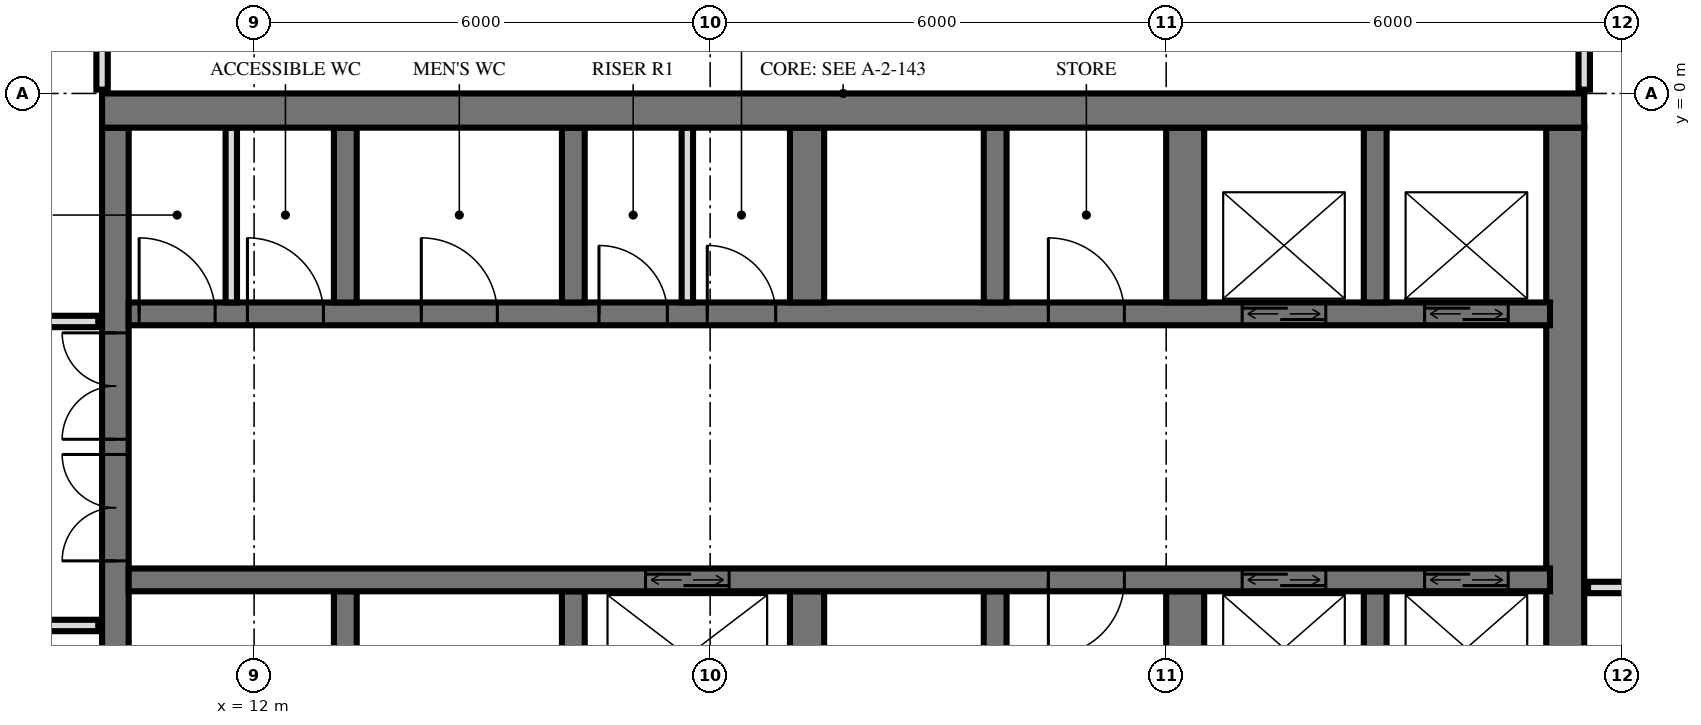
"""IFC4 building model, lengths in metres.
Left out: names, types, materials, properties, quantities, classifications, styles, units other than length and angle.
Written with IfcOpenShell. Run it as: python <this file> out.ifc"""

import sys

from ifc_helpers import new_model, si_unit, direction, frame, frame_2d, origin, place, context, subcontext, project, spatial, rectangle, extrude, element, fill, save


model = new_model("IFC4")
c1 = context("Model", 3, precision=1e-05, world=origin(), true_north=direction((0.0, 1.0)))
c2 = subcontext(c1, "Body", "Model", "MODEL_VIEW")
j1 = project(units=[si_unit("LENGTHUNIT", "METRE"), si_unit("PLANEANGLEUNIT", "RADIAN")], contexts=[c1])
p1 = place(None, origin())
s1 = spatial("IfcSite", under=j1, at=p1, CompositionType="ELEMENT")
p2 = place(p1, origin())
s2 = spatial("IfcBuilding", under=s1, at=p2, CompositionType="ELEMENT")
p3 = place(p2, frame((0.0, 0.0, 70.8)))
s3 = spatial("IfcBuildingStorey", under=s2, at=p3, CompositionType="ELEMENT", Elevation=70.8)
p4 = place(p3, frame((10.0, -0.225, 0.0), z_axis=(0.0, 0.0, 1.0), x_axis=(1.0, 0.0, 0.0)))
e1 = element("IfcWall", 1, at=p4, inside=s3, PredefinedType="SHEAR", context=c2, shape_type="SweptSolid", body=[
    extrude(rectangle(XDim=19.5, YDim=0.45, at=frame_2d((9.75, 0.0))), origin(), (0.0, 0.0, 1.0), 3.6),
])
p5 = place(p3, frame((10.175, -14.55, 0.0), z_axis=(0.0, 0.0, 1.0), x_axis=(0.0, 1.0, 0.0)))
e2 = element("IfcWall", 2, at=p5, inside=s3, PredefinedType="SHEAR", context=c2, shape_type="SweptSolid", body=[
    extrude(rectangle(XDim=14.1, YDim=0.35, at=frame_2d((7.05, 0.0))), origin(), (0.0, 0.0, 1.0), 3.6),
])
p6 = place(p5, frame((8.4, 0.0, 0.0)))
e3 = element("IfcOpeningElement", 3, at=p6, cuts=e2, PredefinedType="OPENING", context=c2, shape_type="SweptSolid", body=[
    extrude(rectangle(XDim=1.4, YDim=2.4, at=frame_2d((0.7, 1.2))), frame((0.0, 0.185, 0.0), z_axis=(0.0, -1.0, 0.0), x_axis=(1.0, 0.0, 0.0)), (0.0, 0.0, 1.0), 0.37),
])
p7 = place(p5, frame((10.0, 0.0, 0.0)))
e4 = element("IfcOpeningElement", 4, at=p7, cuts=e2, PredefinedType="OPENING", context=c2, shape_type="SweptSolid", body=[
    extrude(rectangle(XDim=1.4, YDim=2.4, at=frame_2d((0.7, 1.2))), frame((0.0, 0.185, 0.0), z_axis=(0.0, -1.0, 0.0), x_axis=(1.0, 0.0, 0.0)), (0.0, 0.0, 1.0), 0.37),
])
p8 = place(p5, frame((4.0, 0.0, 0.0)))
e5 = element("IfcOpeningElement", 5, at=p8, cuts=e2, PredefinedType="OPENING", context=c2, shape_type="SweptSolid", body=[
    extrude(rectangle(XDim=1.2, YDim=2.1, at=frame_2d((0.6, 1.05))), frame((0.0, 0.185, 0.0), z_axis=(0.0, -1.0, 0.0), x_axis=(1.0, 0.0, 0.0)), (0.0, 0.0, 1.0), 0.37),
])
p9 = place(p3, frame((29.25, -14.55, 0.0), z_axis=(0.0, 0.0, 1.0), x_axis=(0.0, 1.0, 0.0)))
e6 = element("IfcWall", 6, at=p9, inside=s3, PredefinedType="SHEAR", context=c2, shape_type="SweptSolid", body=[
    extrude(rectangle(XDim=14.1, YDim=0.5, at=frame_2d((7.05, 0.0))), origin(), (0.0, 0.0, 1.0), 3.6),
])
p10 = place(p3, frame((10.35, -2.9, 0.0), z_axis=(0.0, 0.0, 1.0), x_axis=(1.0, 0.0, 0.0)))
e7 = element("IfcWall", 7, at=p10, inside=s3, PredefinedType="SHEAR", context=c2, shape_type="SweptSolid", body=[
    extrude(rectangle(XDim=18.7, YDim=0.3, at=frame_2d((9.35, 0.0))), origin(), (0.0, 0.0, 1.0), 3.6),
])
p11 = place(p10, frame((14.65, 0.0, 0.0)))
e8 = element("IfcOpeningElement", 8, at=p11, cuts=e7, PredefinedType="OPENING", context=c2, shape_type="SweptSolid", body=[
    extrude(rectangle(XDim=1.1, YDim=2.1, at=frame_2d((0.55, 1.05))), frame((0.0, 0.16, 0.0), z_axis=(0.0, -1.0, 0.0), x_axis=(1.0, 0.0, 0.0)), (0.0, 0.0, 1.0), 0.32),
])
p12 = place(p10, frame((17.05, 0.0, 0.0)))
e9 = element("IfcOpeningElement", 9, at=p12, cuts=e7, PredefinedType="OPENING", context=c2, shape_type="SweptSolid", body=[
    extrude(rectangle(XDim=1.1, YDim=2.1, at=frame_2d((0.55, 1.05))), frame((0.0, 0.16, 0.0), z_axis=(0.0, -1.0, 0.0), x_axis=(1.0, 0.0, 0.0)), (0.0, 0.0, 1.0), 0.32),
])
p13 = place(p10, frame((6.188, 0.0, 0.0)))
e10 = element("IfcOpeningElement", 10, at=p13, cuts=e7, PredefinedType="OPENING", context=c2, shape_type="SweptSolid", body=[
    extrude(rectangle(XDim=0.9, YDim=2.1, at=frame_2d((0.45, 1.05))), frame((0.0, 0.16, 0.0), z_axis=(0.0, -1.0, 0.0), x_axis=(1.0, 0.0, 0.0)), (0.0, 0.0, 1.0), 0.32),
])
p14 = place(p10, frame((7.613, 0.0, 0.0)))
e11 = element("IfcOpeningElement", 11, at=p14, cuts=e7, PredefinedType="OPENING", context=c2, shape_type="SweptSolid", body=[
    extrude(rectangle(XDim=0.9, YDim=2.1, at=frame_2d((0.45, 1.05))), frame((0.0, 0.16, 0.0), z_axis=(0.0, -1.0, 0.0), x_axis=(1.0, 0.0, 0.0)), (0.0, 0.0, 1.0), 0.32),
])
p15 = place(p10, frame((0.137, 0.0, 0.0)))
e12 = element("IfcOpeningElement", 12, at=p15, cuts=e7, PredefinedType="OPENING", context=c2, shape_type="SweptSolid", body=[
    extrude(rectangle(XDim=1.0, YDim=2.1, at=frame_2d((0.5, 1.05))), frame((0.0, 0.16, 0.0), z_axis=(0.0, -1.0, 0.0), x_axis=(1.0, 0.0, 0.0)), (0.0, 0.0, 1.0), 0.32),
])
p16 = place(p10, frame((1.562, 0.0, 0.0)))
e13 = element("IfcOpeningElement", 13, at=p16, cuts=e7, PredefinedType="OPENING", context=c2, shape_type="SweptSolid", body=[
    extrude(rectangle(XDim=1.0, YDim=2.1, at=frame_2d((0.5, 1.05))), frame((0.0, 0.16, 0.0), z_axis=(0.0, -1.0, 0.0), x_axis=(1.0, 0.0, 0.0)), (0.0, 0.0, 1.0), 0.32),
])
p17 = place(p10, frame((3.85, 0.0, 0.0)))
e14 = element("IfcOpeningElement", 14, at=p17, cuts=e7, PredefinedType="OPENING", context=c2, shape_type="SweptSolid", body=[
    extrude(rectangle(XDim=1.0, YDim=2.1, at=frame_2d((0.5, 1.05))), frame((0.0, 0.16, 0.0), z_axis=(0.0, -1.0, 0.0), x_axis=(1.0, 0.0, 0.0)), (0.0, 0.0, 1.0), 0.32),
])
p18 = place(p10, frame((12.1, 0.0, 0.0)))
e15 = element("IfcOpeningElement", 15, at=p18, cuts=e7, PredefinedType="OPENING", context=c2, shape_type="SweptSolid", body=[
    extrude(rectangle(XDim=1.0, YDim=2.1, at=frame_2d((0.5, 1.05))), frame((0.0, 0.16, 0.0), z_axis=(0.0, -1.0, 0.0), x_axis=(1.0, 0.0, 0.0)), (0.0, 0.0, 1.0), 0.32),
])
p19 = place(p3, frame((10.35, -6.4, 0.0), z_axis=(0.0, 0.0, 1.0), x_axis=(1.0, 0.0, 0.0)))
e16 = element("IfcWall", 16, at=p19, inside=s3, PredefinedType="SHEAR", context=c2, shape_type="SweptSolid", body=[
    extrude(rectangle(XDim=18.7, YDim=0.3, at=frame_2d((9.35, 0.0))), origin(), (0.0, 0.0, 1.0), 3.6),
])
p20 = place(p19, frame((14.65, 0.0, 0.0)))
e17 = element("IfcOpeningElement", 17, at=p20, cuts=e16, PredefinedType="OPENING", context=c2, shape_type="SweptSolid", body=[
    extrude(rectangle(XDim=1.1, YDim=2.1, at=frame_2d((0.55, 1.05))), frame((0.0, 0.16, 0.0), z_axis=(0.0, -1.0, 0.0), x_axis=(1.0, 0.0, 0.0)), (0.0, 0.0, 1.0), 0.32),
])
p21 = place(p19, frame((17.05, 0.0, 0.0)))
e18 = element("IfcOpeningElement", 18, at=p21, cuts=e16, PredefinedType="OPENING", context=c2, shape_type="SweptSolid", body=[
    extrude(rectangle(XDim=1.1, YDim=2.1, at=frame_2d((0.55, 1.05))), frame((0.0, 0.16, 0.0), z_axis=(0.0, -1.0, 0.0), x_axis=(1.0, 0.0, 0.0)), (0.0, 0.0, 1.0), 0.32),
])
p22 = place(p19, frame((6.8, 0.0, 0.0)))
e19 = element("IfcOpeningElement", 19, at=p22, cuts=e16, PredefinedType="OPENING", context=c2, shape_type="SweptSolid", body=[
    extrude(rectangle(XDim=1.1, YDim=2.1, at=frame_2d((0.55, 1.05))), frame((0.0, 0.16, 0.0), z_axis=(0.0, -1.0, 0.0), x_axis=(1.0, 0.0, 0.0)), (0.0, 0.0, 1.0), 0.32),
])
p23 = place(p19, frame((12.1, 0.0, 0.0)))
e20 = element("IfcOpeningElement", 20, at=p23, cuts=e16, PredefinedType="OPENING", context=c2, shape_type="SweptSolid", body=[
    extrude(rectangle(XDim=1.0, YDim=2.1, at=frame_2d((0.5, 1.05))), frame((0.0, 0.16, 0.0), z_axis=(0.0, -1.0, 0.0), x_axis=(1.0, 0.0, 0.0)), (0.0, 0.0, 1.0), 0.32),
])
for number, where, z_axis, x_axis in (
    (21, (13.2, -2.75, 0.0), (0.0, 0.0, 1.0), (0.0, 1.0, 0.0)),
    (22, (13.2, -8.85, 0.0), (0.0, 0.0, 1.0), (0.0, 1.0, 0.0)),
    (23, (16.2, -2.75, 0.0), (0.0, 0.0, 1.0), (0.0, 1.0, 0.0)),
    (24, (16.2, -8.85, 0.0), (0.0, 0.0, 1.0), (0.0, 1.0, 0.0)),
):
    element("IfcWall", number, at=place(p3, frame(where, z_axis=z_axis, x_axis=x_axis)), inside=s3, PredefinedType="SHEAR", context=c2, shape_type="SweptSolid", body=[
        extrude(rectangle(XDim=2.3, YDim=0.3, at=frame_2d((1.15, 0.0))), origin(), (0.0, 0.0, 1.0), 3.6),
    ])
for number, where, z_axis, x_axis in (
    (25, (19.275, -2.75, 0.0), (0.0, 0.0, 1.0), (0.0, 1.0, 0.0)),
    (26, (19.275, -8.85, 0.0), (0.0, 0.0, 1.0), (0.0, 1.0, 0.0)),
):
    element("IfcWall", number, at=place(p3, frame(where, z_axis=z_axis, x_axis=x_axis)), inside=s3, PredefinedType="SHEAR", context=c2, shape_type="SweptSolid", body=[
        extrude(rectangle(XDim=2.3, YDim=0.45, at=frame_2d((1.15, 0.0))), origin(), (0.0, 0.0, 1.0), 3.6),
    ])
for number, where, z_axis, x_axis in (
    (27, (21.75, -2.75, 0.0), (0.0, 0.0, 1.0), (0.0, 1.0, 0.0)),
    (28, (21.75, -8.85, 0.0), (0.0, 0.0, 1.0), (0.0, 1.0, 0.0)),
):
    element("IfcWall", number, at=place(p3, frame(where, z_axis=z_axis, x_axis=x_axis)), inside=s3, PredefinedType="SHEAR", context=c2, shape_type="SweptSolid", body=[
        extrude(rectangle(XDim=2.3, YDim=0.3, at=frame_2d((1.15, 0.0))), origin(), (0.0, 0.0, 1.0), 3.6),
    ])
for number, where, z_axis, x_axis in (
    (29, (24.25, -2.75, 0.0), (0.0, 0.0, 1.0), (0.0, 1.0, 0.0)),
    (30, (24.25, -8.85, 0.0), (0.0, 0.0, 1.0), (0.0, 1.0, 0.0)),
):
    element("IfcWall", number, at=place(p3, frame(where, z_axis=z_axis, x_axis=x_axis)), inside=s3, PredefinedType="SHEAR", context=c2, shape_type="SweptSolid", body=[
        extrude(rectangle(XDim=2.3, YDim=0.5, at=frame_2d((1.15, 0.0))), origin(), (0.0, 0.0, 1.0), 3.6),
    ])
for number, where, z_axis, x_axis in (
    (31, (26.75, -2.75, 0.0), (0.0, 0.0, 1.0), (0.0, 1.0, 0.0)),
    (32, (26.75, -8.85, 0.0), (0.0, 0.0, 1.0), (0.0, 1.0, 0.0)),
):
    element("IfcWall", number, at=place(p3, frame(where, z_axis=z_axis, x_axis=x_axis)), inside=s3, PredefinedType="SHEAR", context=c2, shape_type="SweptSolid", body=[
        extrude(rectangle(XDim=2.3, YDim=0.3, at=frame_2d((1.15, 0.0))), origin(), (0.0, 0.0, 1.0), 3.6),
    ])
for number, where, z_axis, x_axis in (
    (33, (17.7, -2.75, 0.0), (0.0, 0.0, 1.0), (0.0, 1.0, 0.0)),
    (34, (11.7, -2.75, 0.0), (0.0, 0.0, 1.0), (0.0, 1.0, 0.0)),
):
    element("IfcWall", number, at=place(p3, frame(where, z_axis=z_axis, x_axis=x_axis)), inside=s3, PredefinedType="PARTITIONING", context=c2, shape_type="SweptSolid", body=[
        extrude(rectangle(XDim=2.3, YDim=0.15, at=frame_2d((1.15, 0.0))), origin(), (0.0, 0.0, 1.0), 3.3),
    ])
p24 = place(p3, frame((29.5, 0.05, 0.0), z_axis=(0.0, 0.0, 1.0), x_axis=(0.0, 1.0, 0.0)))
e35 = element("IfcWall", 35, at=p24, inside=s3, PredefinedType="PARTITIONING", context=c2, shape_type="SweptSolid", body=[
    extrude(rectangle(XDim=0.827, YDim=0.15, at=frame_2d((0.414, 0.0))), origin(), (0.0, 0.0, 1.0), 3.32),
])
p25 = place(p3, frame((10.0, 0.05, 0.0), z_axis=(0.0, 0.0, 1.0), x_axis=(0.0, 1.0, 0.0)))
e36 = element("IfcWall", 36, at=p25, inside=s3, PredefinedType="PARTITIONING", context=c2, shape_type="SweptSolid", body=[
    extrude(rectangle(XDim=0.97, YDim=0.15, at=frame_2d((0.485, 0.0))), origin(), (0.0, 0.0, 1.0), 3.32),
])
p26 = place(p3, frame((-9.95, -7.0, 0.0), z_axis=(0.0, 0.0, 1.0), x_axis=(1.0, 0.0, 0.0)))
e37 = element("IfcWall", 37, at=p26, inside=s3, PredefinedType="PARTITIONING", context=c2, shape_type="SweptSolid", body=[
    extrude(rectangle(XDim=19.9, YDim=0.15, at=frame_2d((9.95, 0.0))), origin(), (0.0, 0.0, 1.0), 3.32),
])
p27 = place(p26, frame((9.45, 0.0, 0.0)))
e38 = element("IfcOpeningElement", 38, at=p27, cuts=e37, PredefinedType="OPENING", context=c2, shape_type="SweptSolid", body=[
    extrude(rectangle(XDim=1.0, YDim=2.1, at=frame_2d((0.5, 1.05))), frame((0.0, 0.085, 0.0), z_axis=(0.0, -1.0, 0.0), x_axis=(1.0, 0.0, 0.0)), (0.0, 0.0, 1.0), 0.17),
])
p28 = place(p26, frame((3.45, 0.0, 0.0)))
e39 = element("IfcOpeningElement", 39, at=p28, cuts=e37, PredefinedType="OPENING", context=c2, shape_type="SweptSolid", body=[
    extrude(rectangle(XDim=1.0, YDim=2.1, at=frame_2d((0.5, 1.05))), frame((0.0, 0.085, 0.0), z_axis=(0.0, -1.0, 0.0), x_axis=(1.0, 0.0, 0.0)), (0.0, 0.0, 1.0), 0.17),
])
p29 = place(p3, frame((29.55, -6.5, 0.0), z_axis=(0.0, 0.0, 1.0), x_axis=(1.0, 0.0, 0.0)))
e40 = element("IfcWall", 40, at=p29, inside=s3, PredefinedType="PARTITIONING", context=c2, shape_type="SweptSolid", body=[
    extrude(rectangle(XDim=3.57, YDim=0.15, at=frame_2d((1.785, 0.0))), origin(), (0.0, 0.0, 1.0), 3.32),
])
p30 = place(p29, frame((1.4, 0.0, 0.0)))
e41 = element("IfcOpeningElement", 41, at=p30, cuts=e40, PredefinedType="OPENING", context=c2, shape_type="SweptSolid", body=[
    extrude(rectangle(XDim=0.9, YDim=2.1, at=frame_2d((0.45, 1.05))), frame((0.0, 0.085, 0.0), z_axis=(0.0, -1.0, 0.0), x_axis=(1.0, 0.0, 0.0)), (0.0, 0.0, 1.0), 0.17),
])
p31 = place(p3, frame((-9.95, -3.0, 0.0), z_axis=(0.0, 0.0, 1.0), x_axis=(1.0, 0.0, 0.0)))
e42 = element("IfcWall", 42, at=p31, inside=s3, PredefinedType="PARTITIONING", context=c2, shape_type="SweptSolid", body=[
    extrude(rectangle(XDim=19.9, YDim=0.15, at=frame_2d((9.95, 0.0))), origin(), (0.0, 0.0, 1.0), 3.32),
])
p32 = place(p31, frame((1.45, 0.0, 0.0)))
e43 = element("IfcOpeningElement", 43, at=p32, cuts=e42, PredefinedType="OPENING", context=c2, shape_type="SweptSolid", body=[
    extrude(rectangle(XDim=1.0, YDim=2.1, at=frame_2d((0.5, 1.05))), frame((0.0, 0.085, 0.0), z_axis=(0.0, -1.0, 0.0), x_axis=(1.0, 0.0, 0.0)), (0.0, 0.0, 1.0), 0.17),
])
p33 = place(p31, frame((4.95, 0.0, 0.0)))
e44 = element("IfcOpeningElement", 44, at=p33, cuts=e42, PredefinedType="OPENING", context=c2, shape_type="SweptSolid", body=[
    extrude(rectangle(XDim=1.0, YDim=2.1, at=frame_2d((0.5, 1.05))), frame((0.0, 0.085, 0.0), z_axis=(0.0, -1.0, 0.0), x_axis=(1.0, 0.0, 0.0)), (0.0, 0.0, 1.0), 0.17),
])
p34 = place(p31, frame((7.7, 0.0, 0.0)))
e45 = element("IfcOpeningElement", 45, at=p34, cuts=e42, PredefinedType="OPENING", context=c2, shape_type="SweptSolid", body=[
    extrude(rectangle(XDim=1.0, YDim=2.1, at=frame_2d((0.5, 1.05))), frame((0.0, 0.085, 0.0), z_axis=(0.0, -1.0, 0.0), x_axis=(1.0, 0.0, 0.0)), (0.0, 0.0, 1.0), 0.17),
])
p35 = place(p31, frame((14.2, 0.0, 0.0)))
e46 = element("IfcOpeningElement", 46, at=p35, cuts=e42, PredefinedType="OPENING", context=c2, shape_type="SweptSolid", body=[
    extrude(rectangle(XDim=1.0, YDim=2.1, at=frame_2d((0.5, 1.05))), frame((0.0, 0.085, 0.0), z_axis=(0.0, -1.0, 0.0), x_axis=(1.0, 0.0, 0.0)), (0.0, 0.0, 1.0), 0.17),
])
p36 = place(p11, origin())
e47 = element("IfcDoor", 47, at=p36, inside=s3, OperationType="DOUBLE_DOOR_SLIDING", PredefinedType="USERDEFINED", context=c2, shape_type="SweptSolid", body=[
    extrude(rectangle(XDim=1.1, YDim=2.1, at=frame_2d((0.55, 1.05))), frame((0.0, 0.025, 0.0), z_axis=(0.0, -1.0, 0.0), x_axis=(1.0, 0.0, 0.0)), (0.0, 0.0, 1.0), 0.05),
])
fill(e8, e47)
p37 = place(p12, origin())
e48 = element("IfcDoor", 48, at=p37, inside=s3, OperationType="DOUBLE_DOOR_SLIDING", PredefinedType="USERDEFINED", context=c2, shape_type="SweptSolid", body=[
    extrude(rectangle(XDim=1.1, YDim=2.1, at=frame_2d((0.55, 1.05))), frame((0.0, 0.025, 0.0), z_axis=(0.0, -1.0, 0.0), x_axis=(1.0, 0.0, 0.0)), (0.0, 0.0, 1.0), 0.05),
])
fill(e9, e48)
p38 = place(p20, origin())
e49 = element("IfcDoor", 49, at=p38, inside=s3, OperationType="DOUBLE_DOOR_SLIDING", PredefinedType="USERDEFINED", context=c2, shape_type="SweptSolid", body=[
    extrude(rectangle(XDim=1.1, YDim=2.1, at=frame_2d((0.55, 1.05))), frame((0.0, 0.025, 0.0), z_axis=(0.0, -1.0, 0.0), x_axis=(1.0, 0.0, 0.0)), (0.0, 0.0, 1.0), 0.05),
])
fill(e17, e49)
p39 = place(p21, origin())
e50 = element("IfcDoor", 50, at=p39, inside=s3, OperationType="DOUBLE_DOOR_SLIDING", PredefinedType="USERDEFINED", context=c2, shape_type="SweptSolid", body=[
    extrude(rectangle(XDim=1.1, YDim=2.1, at=frame_2d((0.55, 1.05))), frame((0.0, 0.025, 0.0), z_axis=(0.0, -1.0, 0.0), x_axis=(1.0, 0.0, 0.0)), (0.0, 0.0, 1.0), 0.05),
])
fill(e18, e50)
p40 = place(p22, origin())
e51 = element("IfcDoor", 51, at=p40, inside=s3, OperationType="DOUBLE_DOOR_SLIDING", PredefinedType="USERDEFINED", context=c2, shape_type="SweptSolid", body=[
    extrude(rectangle(XDim=1.1, YDim=2.1, at=frame_2d((0.55, 1.05))), frame((0.0, 0.025, 0.0), z_axis=(0.0, -1.0, 0.0), x_axis=(1.0, 0.0, 0.0)), (0.0, 0.0, 1.0), 0.05),
])
fill(e19, e51)
p41 = place(p6, origin())
e52 = element("IfcDoor", 52, at=p41, inside=s3, OperationType="DOUBLE_DOOR_SINGLE_SWING", PredefinedType="DOOR", context=c2, shape_type="SweptSolid", body=[
    extrude(rectangle(XDim=1.4, YDim=2.4, at=frame_2d((0.7, 1.2))), frame((0.0, 0.025, 0.0), z_axis=(0.0, -1.0, 0.0), x_axis=(1.0, 0.0, 0.0)), (0.0, 0.0, 1.0), 0.05),
])
fill(e3, e52)
p42 = place(p7, origin())
e53 = element("IfcDoor", 53, at=p42, inside=s3, OperationType="DOUBLE_DOOR_SINGLE_SWING", PredefinedType="DOOR", context=c2, shape_type="SweptSolid", body=[
    extrude(rectangle(XDim=1.4, YDim=2.4, at=frame_2d((0.7, 1.2))), frame((0.0, 0.025, 0.0), z_axis=(0.0, -1.0, 0.0), x_axis=(1.0, 0.0, 0.0)), (0.0, 0.0, 1.0), 0.05),
])
fill(e4, e53)
p43 = place(p13, origin())
e54 = element("IfcDoor", 54, at=p43, inside=s3, OperationType="SINGLE_SWING_RIGHT", PredefinedType="DOOR", context=c2, shape_type="SweptSolid", body=[
    extrude(rectangle(XDim=0.9, YDim=2.1, at=frame_2d((0.45, 1.05))), frame((0.0, 0.025, 0.0), z_axis=(0.0, -1.0, 0.0), x_axis=(1.0, 0.0, 0.0)), (0.0, 0.0, 1.0), 0.05),
])
fill(e10, e54)
p44 = place(p14, origin())
e55 = element("IfcDoor", 55, at=p44, inside=s3, OperationType="SINGLE_SWING_RIGHT", PredefinedType="DOOR", context=c2, shape_type="SweptSolid", body=[
    extrude(rectangle(XDim=0.9, YDim=2.1, at=frame_2d((0.45, 1.05))), frame((0.0, 0.025, 0.0), z_axis=(0.0, -1.0, 0.0), x_axis=(1.0, 0.0, 0.0)), (0.0, 0.0, 1.0), 0.05),
])
fill(e11, e55)
p45 = place(p15, origin())
e56 = element("IfcDoor", 56, at=p45, inside=s3, OperationType="SINGLE_SWING_RIGHT", PredefinedType="DOOR", context=c2, shape_type="SweptSolid", body=[
    extrude(rectangle(XDim=1.0, YDim=2.1, at=frame_2d((0.5, 1.05))), frame((0.0, 0.025, 0.0), z_axis=(0.0, -1.0, 0.0), x_axis=(1.0, 0.0, 0.0)), (0.0, 0.0, 1.0), 0.05),
])
fill(e12, e56)
p46 = place(p16, origin())
e57 = element("IfcDoor", 57, at=p46, inside=s3, OperationType="SINGLE_SWING_RIGHT", PredefinedType="DOOR", context=c2, shape_type="SweptSolid", body=[
    extrude(rectangle(XDim=1.0, YDim=2.1, at=frame_2d((0.5, 1.05))), frame((0.0, 0.025, 0.0), z_axis=(0.0, -1.0, 0.0), x_axis=(1.0, 0.0, 0.0)), (0.0, 0.0, 1.0), 0.05),
])
fill(e13, e57)
p47 = place(p17, origin())
e58 = element("IfcDoor", 58, at=p47, inside=s3, OperationType="SINGLE_SWING_RIGHT", PredefinedType="DOOR", context=c2, shape_type="SweptSolid", body=[
    extrude(rectangle(XDim=1.0, YDim=2.1, at=frame_2d((0.5, 1.05))), frame((0.0, 0.025, 0.0), z_axis=(0.0, -1.0, 0.0), x_axis=(1.0, 0.0, 0.0)), (0.0, 0.0, 1.0), 0.05),
])
fill(e14, e58)
p48 = place(p18, origin())
e59 = element("IfcDoor", 59, at=p48, inside=s3, OperationType="SINGLE_SWING_RIGHT", PredefinedType="DOOR", context=c2, shape_type="SweptSolid", body=[
    extrude(rectangle(XDim=1.0, YDim=2.1, at=frame_2d((0.5, 1.05))), frame((0.0, 0.025, 0.0), z_axis=(0.0, -1.0, 0.0), x_axis=(1.0, 0.0, 0.0)), (0.0, 0.0, 1.0), 0.05),
])
fill(e15, e59)
p49 = place(p23, frame((0.5, 0.0, 0.0), z_axis=(0.0, 0.0, 1.0), x_axis=(-1.0, 0.0, 0.0)))
e60 = element("IfcDoor", 60, at=p49, inside=s3, OperationType="SINGLE_SWING_LEFT", PredefinedType="DOOR", context=c2, shape_type="SweptSolid", body=[
    extrude(rectangle(XDim=1.0, YDim=2.1, at=frame_2d((0.0, 1.05))), frame((0.0, -0.025, 0.0), z_axis=(0.0, 1.0, 0.0), x_axis=(-1.0, 0.0, 0.0)), (0.0, 0.0, 1.0), 0.05),
])
fill(e20, e60)
save(model, sys.argv[1])
